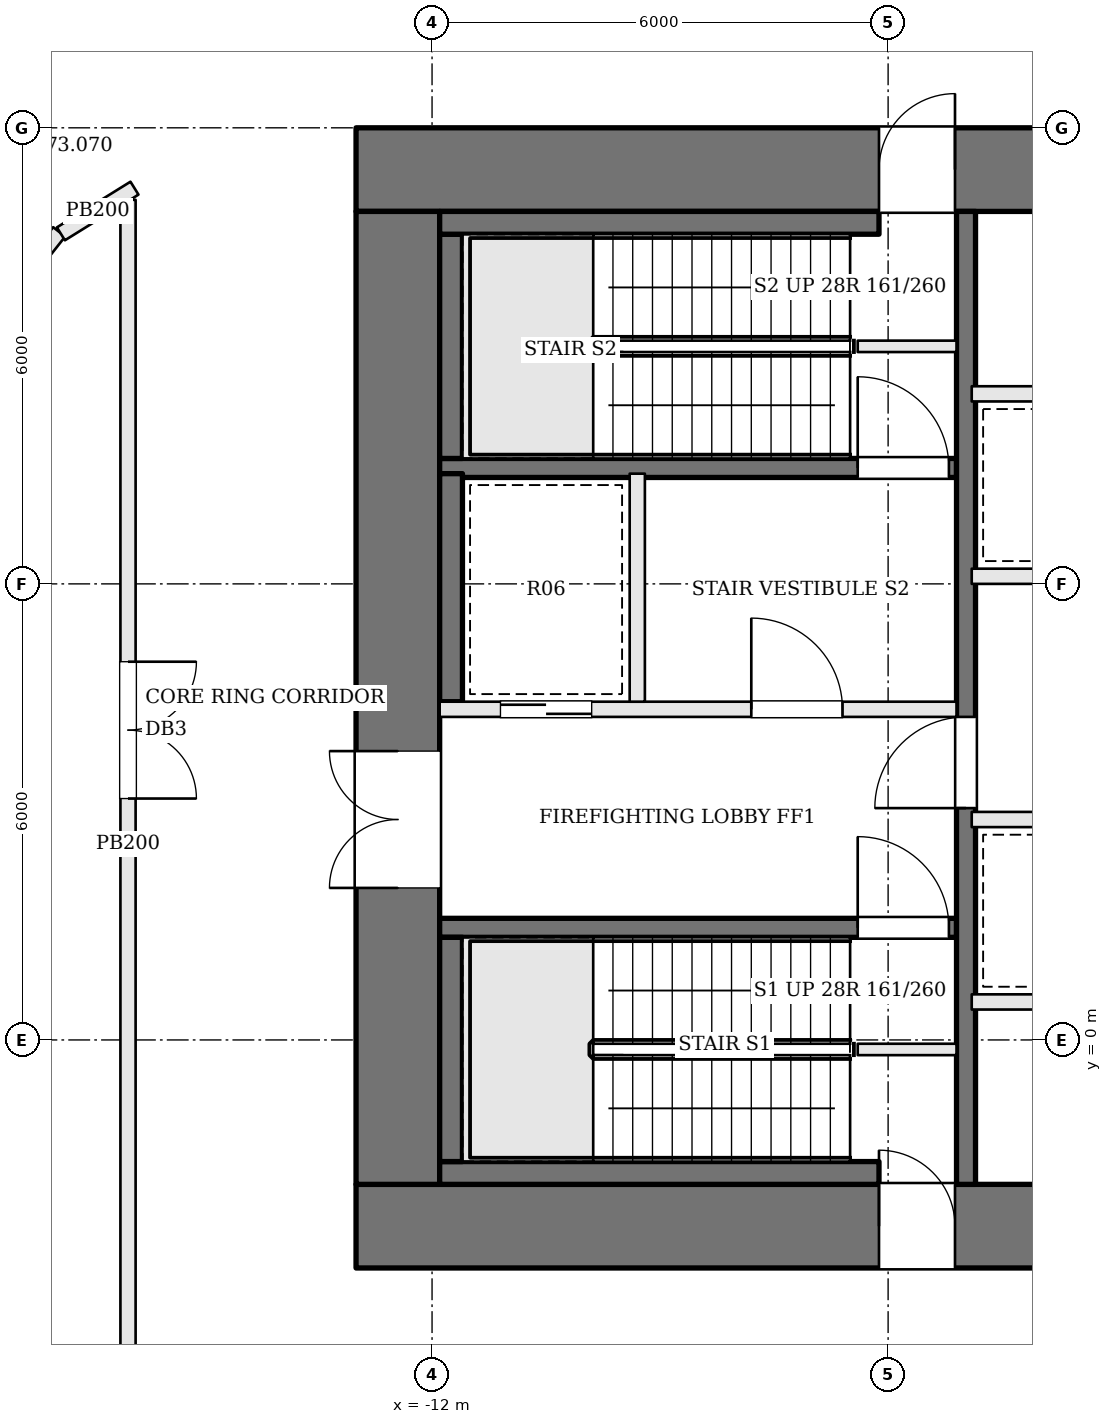
"""IFC4 building model, lengths in metres.
Left out: names, types, materials, properties, quantities, classifications, styles, units other than length and angle.
Written with IfcOpenShell. Run it as: python <this file> out.ifc"""

import sys

from ifc_helpers import new_model, si_unit, direction, frame, frame_2d, origin, place, context, subcontext, project, spatial, rectangle, extrude, element, fill, save


model = new_model("IFC4")
c1 = context("Model", 3, precision=1e-05, world=origin(), true_north=direction((0.0, 1.0)))
c2 = subcontext(c1, "Body", "Model", "MODEL_VIEW")
j1 = project(units=[si_unit("LENGTHUNIT", "METRE"), si_unit("PLANEANGLEUNIT", "RADIAN")], contexts=[c1])
p1 = place(None, origin())
s1 = spatial("IfcSite", under=j1, at=p1, CompositionType="ELEMENT")
p2 = place(p1, origin())
s2 = spatial("IfcBuilding", under=s1, at=p2, CompositionType="ELEMENT")
p3 = place(p2, frame((0.0, 0.0, 169.5)))
s3 = spatial("IfcBuildingStorey", under=s2, at=p3, CompositionType="ELEMENT", Elevation=169.5)
p4 = place(p3, frame((-13.0, 11.45, 0.0), z_axis=(0.0, 0.0, 1.0), x_axis=(1.0, 0.0, 0.0)))
e1 = element("IfcWall", 1, at=p4, inside=s3, PredefinedType="SHEAR", context=c2, shape_type="SweptSolid", body=[
    extrude(rectangle(XDim=26.0, YDim=1.1, at=frame_2d((13.0, 0.0))), origin(), (0.0, 0.0, 1.0), 4.5),
])
p5 = place(p4, frame((9.125, 0.0, 0.0)))
e2 = element("IfcOpeningElement", 2, at=p5, cuts=e1, PredefinedType="OPENING", context=c2, shape_type="SweptSolid", body=[
    extrude(rectangle(XDim=1.2, YDim=2.1, at=frame_2d((0.6, 1.05))), frame((0.0, 0.56, 0.0), z_axis=(0.0, -1.0, 0.0), x_axis=(1.0, 0.0, 0.0)), (0.0, 0.0, 1.0), 1.12),
])
p6 = place(p4, frame((12.375, 0.0, 0.0)))
e3 = element("IfcOpeningElement", 3, at=p6, cuts=e1, PredefinedType="OPENING", context=c2, shape_type="SweptSolid", body=[
    extrude(rectangle(XDim=1.2, YDim=2.1, at=frame_2d((0.6, 1.05))), frame((0.0, 0.56, 0.0), z_axis=(0.0, -1.0, 0.0), x_axis=(1.0, 0.0, 0.0)), (0.0, 0.0, 1.0), 1.12),
])
p7 = place(p4, frame((15.9, 0.0, 0.0)))
e4 = element("IfcOpeningElement", 4, at=p7, cuts=e1, PredefinedType="OPENING", context=c2, shape_type="SweptSolid", body=[
    extrude(rectangle(XDim=0.7, YDim=2.1, at=frame_2d((0.35, 1.05))), frame((0.0, 0.56, 0.0), z_axis=(0.0, -1.0, 0.0), x_axis=(1.0, 0.0, 0.0)), (0.0, 0.0, 1.0), 1.12),
])
p8 = place(p4, frame((6.88, 0.0, 0.0)))
e5 = element("IfcOpeningElement", 5, at=p8, cuts=e1, PredefinedType="OPENING", context=c2, shape_type="SweptSolid", body=[
    extrude(rectangle(XDim=1.0, YDim=2.1, at=frame_2d((0.5, 1.05))), frame((0.0, 0.56, 0.0), z_axis=(0.0, -1.0, 0.0), x_axis=(1.0, 0.0, 0.0)), (0.0, 0.0, 1.0), 1.12),
])
p9 = place(p4, frame((18.12, 0.0, 0.0)))
e6 = element("IfcOpeningElement", 6, at=p9, cuts=e1, PredefinedType="OPENING", context=c2, shape_type="SweptSolid", body=[
    extrude(rectangle(XDim=1.0, YDim=2.1, at=frame_2d((0.5, 1.05))), frame((0.0, 0.56, 0.0), z_axis=(0.0, -1.0, 0.0), x_axis=(1.0, 0.0, 0.0)), (0.0, 0.0, 1.0), 1.12),
])
p10 = place(p3, frame((-13.0, -2.45, 0.0), z_axis=(0.0, 0.0, 1.0), x_axis=(1.0, 0.0, 0.0)))
e7 = element("IfcWall", 7, at=p10, inside=s3, PredefinedType="SHEAR", context=c2, shape_type="SweptSolid", body=[
    extrude(rectangle(XDim=26.0, YDim=1.1, at=frame_2d((13.0, 0.0))), origin(), (0.0, 0.0, 1.0), 4.5),
])
p11 = place(p10, frame((8.975, 0.0, 0.0)))
e8 = element("IfcOpeningElement", 8, at=p11, cuts=e7, PredefinedType="OPENING", context=c2, shape_type="SweptSolid", body=[
    extrude(rectangle(XDim=0.7, YDim=2.1, at=frame_2d((0.35, 1.05))), frame((0.0, 0.56, 0.0), z_axis=(0.0, -1.0, 0.0), x_axis=(1.0, 0.0, 0.0)), (0.0, 0.0, 1.0), 1.12),
])
p12 = place(p10, frame((12.0, 0.0, 0.0)))
e9 = element("IfcOpeningElement", 9, at=p12, cuts=e7, PredefinedType="OPENING", context=c2, shape_type="SweptSolid", body=[
    extrude(rectangle(XDim=1.2, YDim=2.1, at=frame_2d((0.6, 1.05))), frame((0.0, 0.56, 0.0), z_axis=(0.0, -1.0, 0.0), x_axis=(1.0, 0.0, 0.0)), (0.0, 0.0, 1.0), 1.12),
])
p13 = place(p10, frame((15.675, 0.0, 0.0)))
e10 = element("IfcOpeningElement", 10, at=p13, cuts=e7, PredefinedType="OPENING", context=c2, shape_type="SweptSolid", body=[
    extrude(rectangle(XDim=1.2, YDim=2.1, at=frame_2d((0.6, 1.05))), frame((0.0, 0.56, 0.0), z_axis=(0.0, -1.0, 0.0), x_axis=(1.0, 0.0, 0.0)), (0.0, 0.0, 1.0), 1.12),
])
p14 = place(p10, frame((6.88, 0.0, 0.0)))
e11 = element("IfcOpeningElement", 11, at=p14, cuts=e7, PredefinedType="OPENING", context=c2, shape_type="SweptSolid", body=[
    extrude(rectangle(XDim=1.0, YDim=2.1, at=frame_2d((0.5, 1.05))), frame((0.0, 0.56, 0.0), z_axis=(0.0, -1.0, 0.0), x_axis=(1.0, 0.0, 0.0)), (0.0, 0.0, 1.0), 1.12),
])
p15 = place(p10, frame((18.12, 0.0, 0.0)))
e12 = element("IfcOpeningElement", 12, at=p15, cuts=e7, PredefinedType="OPENING", context=c2, shape_type="SweptSolid", body=[
    extrude(rectangle(XDim=1.0, YDim=2.1, at=frame_2d((0.5, 1.05))), frame((0.0, 0.56, 0.0), z_axis=(0.0, -1.0, 0.0), x_axis=(1.0, 0.0, 0.0)), (0.0, 0.0, 1.0), 1.12),
])
p16 = place(p3, frame((-12.45, -1.9, 0.0), z_axis=(0.0, 0.0, 1.0), x_axis=(0.0, 1.0, 0.0)))
e13 = element("IfcWall", 13, at=p16, inside=s3, PredefinedType="SHEAR", context=c2, shape_type="SweptSolid", body=[
    extrude(rectangle(XDim=12.8, YDim=1.1, at=frame_2d((6.4, 0.0))), origin(), (0.0, 0.0, 1.0), 4.5),
])
p17 = place(p16, frame((3.9, 0.0, 0.0)))
e14 = element("IfcOpeningElement", 14, at=p17, cuts=e13, PredefinedType="OPENING", context=c2, shape_type="SweptSolid", body=[
    extrude(rectangle(XDim=1.8, YDim=2.1, at=frame_2d((0.9, 1.05))), frame((0.0, 0.56, 0.0), z_axis=(0.0, -1.0, 0.0), x_axis=(1.0, 0.0, 0.0)), (0.0, 0.0, 1.0), 1.12),
])
for number, where, z_axis, x_axis in (
    (15, (-6.4, -0.125, 0.0), (0.0, 0.0, 1.0), (1.0, 0.0, 0.0)),
    (16, (-6.4, 9.125, 0.0), (0.0, 0.0, 1.0), (1.0, 0.0, 0.0)),
):
    element("IfcWall", number, at=place(p3, frame(where, z_axis=z_axis, x_axis=x_axis)), inside=s3, PredefinedType="SOLIDWALL", context=c2, shape_type="SweptSolid", body=[
        extrude(rectangle(XDim=1.3, YDim=0.15, at=frame_2d((0.65, 0.0))), origin(), (0.0, 0.0, 1.0), 4.3),
    ])
p18 = place(p3, frame((-11.9, 1.475, 0.0), z_axis=(0.0, 0.0, 1.0), x_axis=(1.0, 0.0, 0.0)))
e17 = element("IfcWall", 17, at=p18, inside=s3, PredefinedType="SOLIDWALL", context=c2, shape_type="SweptSolid", body=[
    extrude(rectangle(XDim=6.8, YDim=0.25, at=frame_2d((3.4, 0.0))), origin(), (0.0, 0.0, 1.0), 4.3),
])
p19 = place(p18, frame((5.5, 0.0, 0.0)))
e18 = element("IfcOpeningElement", 18, at=p19, cuts=e17, PredefinedType="OPENING", context=c2, shape_type="SweptSolid", body=[
    extrude(rectangle(XDim=1.2, YDim=2.1, at=frame_2d((0.6, 1.05))), frame((0.0, 0.135, 0.0), z_axis=(0.0, -1.0, 0.0), x_axis=(1.0, 0.0, 0.0)), (0.0, 0.0, 1.0), 0.27),
])
p20 = place(p3, frame((-11.9, 4.35, 0.0), z_axis=(0.0, 0.0, 1.0), x_axis=(1.0, 0.0, 0.0)))
e19 = element("IfcWall", 19, at=p20, inside=s3, PredefinedType="SOLIDWALL", context=c2, shape_type="SweptSolid", body=[
    extrude(rectangle(XDim=6.8, YDim=0.2, at=frame_2d((3.4, 0.0))), origin(), (0.0, 0.0, 1.0), 4.3),
])
p21 = place(p20, frame((4.1, 0.0, 0.0)))
e20 = element("IfcOpeningElement", 20, at=p21, cuts=e19, PredefinedType="OPENING", context=c2, shape_type="SweptSolid", body=[
    extrude(rectangle(XDim=1.2, YDim=2.1, at=frame_2d((0.6, 1.05))), frame((0.0, 0.11, 0.0), z_axis=(0.0, -1.0, 0.0), x_axis=(1.0, 0.0, 0.0)), (0.0, 0.0, 1.0), 0.22),
])
p22 = place(p20, frame((0.8, 0.0, 0.0)))
e21 = element("IfcOpeningElement", 21, at=p22, cuts=e19, PredefinedType="OPENING", context=c2, shape_type="SweptSolid", body=[
    extrude(rectangle(XDim=1.2, YDim=2.1, at=frame_2d((0.6, 1.05))), frame((0.0, 0.11, 0.0), z_axis=(0.0, -1.0, 0.0), x_axis=(1.0, 0.0, 0.0)), (0.0, 0.0, 1.0), 0.22),
])
p23 = place(p3, frame((-11.9, 7.525, 0.0), z_axis=(0.0, 0.0, 1.0), x_axis=(1.0, 0.0, 0.0)))
e22 = element("IfcWall", 22, at=p23, inside=s3, PredefinedType="SOLIDWALL", context=c2, shape_type="SweptSolid", body=[
    extrude(rectangle(XDim=6.8, YDim=0.25, at=frame_2d((3.4, 0.0))), origin(), (0.0, 0.0, 1.0), 4.3),
])
p24 = place(p23, frame((5.5, 0.0, 0.0)))
e23 = element("IfcOpeningElement", 23, at=p24, cuts=e22, PredefinedType="OPENING", context=c2, shape_type="SweptSolid", body=[
    extrude(rectangle(XDim=1.2, YDim=2.1, at=frame_2d((0.6, 1.05))), frame((0.0, 0.135, 0.0), z_axis=(0.0, -1.0, 0.0), x_axis=(1.0, 0.0, 0.0)), (0.0, 0.0, 1.0), 0.27),
])
p25 = place(p3, frame((-9.3, 4.45, 0.0), z_axis=(0.0, 0.0, 1.0), x_axis=(0.0, 1.0, 0.0)))
e24 = element("IfcWall", 24, at=p25, inside=s3, PredefinedType="SOLIDWALL", context=c2, shape_type="SweptSolid", body=[
    extrude(rectangle(XDim=3.0, YDim=0.2, at=frame_2d((1.5, 0.0))), origin(), (0.0, 0.0, 1.0), 4.3),
])
p26 = place(p3, frame((-4.975, -1.9, 0.0), z_axis=(0.0, 0.0, 1.0), x_axis=(0.0, 1.0, 0.0)))
e25 = element("IfcWall", 25, at=p26, inside=s3, PredefinedType="SOLIDWALL", context=c2, shape_type="SweptSolid", body=[
    extrude(rectangle(XDim=12.8, YDim=0.25, at=frame_2d((6.4, 0.0))), origin(), (0.0, 0.0, 1.0), 4.3),
])
p27 = place(p26, frame((4.95, 0.0, 0.0)))
e26 = element("IfcOpeningElement", 26, at=p27, cuts=e25, PredefinedType="OPENING", context=c2, shape_type="SweptSolid", body=[
    extrude(rectangle(XDim=1.2, YDim=2.1, at=frame_2d((0.6, 1.05))), frame((0.0, 0.135, 0.0), z_axis=(0.0, -1.0, 0.0), x_axis=(1.0, 0.0, 0.0)), (0.0, 0.0, 1.0), 0.27),
])
p28 = place(p3, frame((-11.9, -1.75, 0.0), z_axis=(0.0, 0.0, 1.0), x_axis=(1.0, 0.0, 0.0)))
e27 = element("IfcWall", 27, at=p28, inside=s3, PredefinedType="SOLIDWALL", context=c2, shape_type="SweptSolid", body=[
    extrude(rectangle(XDim=5.78, YDim=0.3, at=frame_2d((2.89, 0.0))), origin(), (0.0, 0.0, 1.0), 4.3),
])
p29 = place(p3, frame((-11.75, -1.6, 0.0), z_axis=(0.0, 0.0, 1.0), x_axis=(0.0, 1.0, 0.0)))
e28 = element("IfcWall", 28, at=p29, inside=s3, PredefinedType="SOLIDWALL", context=c2, shape_type="SweptSolid", body=[
    extrude(rectangle(XDim=2.95, YDim=0.3, at=frame_2d((1.475, 0.0))), origin(), (0.0, 0.0, 1.0), 4.3),
])
p30 = place(p3, frame((-11.75, 4.45, 0.0), z_axis=(0.0, 0.0, 1.0), x_axis=(0.0, 1.0, 0.0)))
e29 = element("IfcWall", 29, at=p30, inside=s3, PredefinedType="SOLIDWALL", context=c2, shape_type="SweptSolid", body=[
    extrude(rectangle(XDim=3.0, YDim=0.3, at=frame_2d((1.5, 0.0))), origin(), (0.0, 0.0, 1.0), 4.3),
])
p31 = place(p3, frame((-11.75, 7.65, 0.0), z_axis=(0.0, 0.0, 1.0), x_axis=(0.0, 1.0, 0.0)))
e30 = element("IfcWall", 30, at=p31, inside=s3, PredefinedType="SOLIDWALL", context=c2, shape_type="SweptSolid", body=[
    extrude(rectangle(XDim=2.95, YDim=0.3, at=frame_2d((1.475, 0.0))), origin(), (0.0, 0.0, 1.0), 4.3),
])
p32 = place(p3, frame((-11.9, 10.75, 0.0), z_axis=(0.0, 0.0, 1.0), x_axis=(1.0, 0.0, 0.0)))
e31 = element("IfcWall", 31, at=p32, inside=s3, PredefinedType="SOLIDWALL", context=c2, shape_type="SweptSolid", body=[
    extrude(rectangle(XDim=5.78, YDim=0.3, at=frame_2d((2.89, 0.0))), origin(), (0.0, 0.0, 1.0), 4.3),
])
p33 = place(p3, frame((-4.9, 0.5, 0.0), z_axis=(0.0, 0.0, 1.0), x_axis=(1.0, 0.0, 0.0)))
e32 = element("IfcWall", 32, at=p33, inside=s3, PredefinedType="SOLIDWALL", context=c2, shape_type="SweptSolid", body=[
    extrude(rectangle(XDim=9.8, YDim=0.2, at=frame_2d((4.9, 0.0))), origin(), (0.0, 0.0, 1.0), 4.3),
])
p34 = place(p3, frame((-4.9, 2.9, 0.0), z_axis=(0.0, 0.0, 1.0), x_axis=(1.0, 0.0, 0.0)))
e33 = element("IfcWall", 33, at=p34, inside=s3, PredefinedType="SOLIDWALL", context=c2, shape_type="SweptSolid", body=[
    extrude(rectangle(XDim=9.8, YDim=0.2, at=frame_2d((4.9, 0.0))), origin(), (0.0, 0.0, 1.0), 4.3),
])
p35 = place(p34, frame((2.613, 0.0, 0.0)))
e34 = element("IfcOpeningElement", 34, at=p35, cuts=e33, PredefinedType="OPENING", context=c2, shape_type="SweptSolid", body=[
    extrude(rectangle(XDim=0.9, YDim=2.1, at=frame_2d((0.45, 1.05))), frame((0.0, 0.11, 0.0), z_axis=(0.0, -1.0, 0.0), x_axis=(1.0, 0.0, 0.0)), (0.0, 0.0, 1.0), 0.22),
])
p36 = place(p34, frame((7.463, 0.0, 0.0)))
e35 = element("IfcOpeningElement", 35, at=p36, cuts=e33, PredefinedType="OPENING", context=c2, shape_type="SweptSolid", body=[
    extrude(rectangle(XDim=1.0, YDim=2.1, at=frame_2d((0.5, 1.05))), frame((0.0, 0.11, 0.0), z_axis=(0.0, -1.0, 0.0), x_axis=(1.0, 0.0, 0.0)), (0.0, 0.0, 1.0), 0.22),
])
for number, where, z_axis, x_axis in (
    (36, (-4.9, 6.1, 0.0), (0.0, 0.0, 1.0), (1.0, 0.0, 0.0)),
    (37, (-4.9, 8.5, 0.0), (0.0, 0.0, 1.0), (1.0, 0.0, 0.0)),
):
    element("IfcWall", number, at=place(p3, frame(where, z_axis=z_axis, x_axis=x_axis)), inside=s3, PredefinedType="SOLIDWALL", context=c2, shape_type="SweptSolid", body=[
        extrude(rectangle(XDim=9.8, YDim=0.2, at=frame_2d((4.9, 0.0))), origin(), (0.0, 0.0, 1.0), 4.3),
    ])
p37 = place(p3, frame((-19.849, 6.895, 0.0), z_axis=(0.0, 0.0, 1.0), x_axis=(0.618811760178, 0.785539308669, 0.0)))
e38 = element("IfcWall", 38, at=p37, inside=s3, PredefinedType="PARTITIONING", context=c2, shape_type="SweptSolid", body=[
    extrude(rectangle(XDim=4.756, YDim=0.2, at=frame_2d((2.378, 0.0))), origin(), (0.0, 0.0, 1.0), 4.3),
])
p38 = place(p3, frame((-16.883, 10.605, 0.0), z_axis=(0.0, 0.0, 1.0), x_axis=(0.84954745962, 0.527512193085, 0.0)))
e39 = element("IfcWall", 39, at=p38, inside=s3, PredefinedType="PARTITIONING", context=c2, shape_type="SweptSolid", body=[
    extrude(rectangle(XDim=1.139, YDim=0.2, at=frame_2d((0.57, 0.0))), origin(), (0.0, 0.0, 1.0), 4.3),
])
p39 = place(p3, frame((-16.0, 11.053, 0.0), z_axis=(0.0, 0.0, 1.0), x_axis=(0.0, -1.0, 0.0)))
e40 = element("IfcWall", 40, at=p39, inside=s3, PredefinedType="PARTITIONING", context=c2, shape_type="SweptSolid", body=[
    extrude(rectangle(XDim=16.953, YDim=0.2, at=frame_2d((8.477, 0.0))), origin(), (0.0, 0.0, 1.0), 4.3),
])
p40 = place(p39, frame((6.077, 0.0, 0.0)))
e41 = element("IfcOpeningElement", 41, at=p40, cuts=e40, PredefinedType="OPENING", context=c2, shape_type="SweptSolid", body=[
    extrude(rectangle(XDim=1.8, YDim=2.1, at=frame_2d((0.9, 1.05))), frame((0.0, 0.11, 0.0), z_axis=(0.0, -1.0, 0.0), x_axis=(1.0, 0.0, 0.0)), (0.0, 0.0, 1.0), 0.22),
])
p41 = place(p17, origin())
e42 = element("IfcDoor", 42, at=p41, inside=s3, OperationType="DOUBLE_DOOR_SINGLE_SWING", PredefinedType="DOOR", context=c2, shape_type="SweptSolid", body=[
    extrude(rectangle(XDim=1.8, YDim=2.1, at=frame_2d((0.9, 1.05))), frame((0.0, 0.025, 0.0), z_axis=(0.0, -1.0, 0.0), x_axis=(1.0, 0.0, 0.0)), (0.0, 0.0, 1.0), 0.05),
])
fill(e14, e42)
p42 = place(p27, origin())
e43 = element("IfcDoor", 43, at=p42, inside=s3, OperationType="SINGLE_SWING_LEFT", PredefinedType="DOOR", context=c2, shape_type="SweptSolid", body=[
    extrude(rectangle(XDim=1.2, YDim=2.1, at=frame_2d((0.6, 1.05))), frame((0.0, 0.025, 0.0), z_axis=(0.0, -1.0, 0.0), x_axis=(1.0, 0.0, 0.0)), (0.0, 0.0, 1.0), 0.05),
])
fill(e26, e43)
p43 = place(p21, origin())
e44 = element("IfcDoor", 44, at=p43, inside=s3, OperationType="SINGLE_SWING_LEFT", PredefinedType="DOOR", context=c2, shape_type="SweptSolid", body=[
    extrude(rectangle(XDim=1.2, YDim=2.1, at=frame_2d((0.6, 1.05))), frame((0.0, 0.025, 0.0), z_axis=(0.0, -1.0, 0.0), x_axis=(1.0, 0.0, 0.0)), (0.0, 0.0, 1.0), 0.05),
])
fill(e20, e44)
p44 = place(p19, origin())
e45 = element("IfcDoor", 45, at=p44, inside=s3, OperationType="SINGLE_SWING_LEFT", PredefinedType="DOOR", context=c2, shape_type="SweptSolid", body=[
    extrude(rectangle(XDim=1.2, YDim=2.1, at=frame_2d((0.6, 1.05))), frame((0.0, 0.025, 0.0), z_axis=(0.0, -1.0, 0.0), x_axis=(1.0, 0.0, 0.0)), (0.0, 0.0, 1.0), 0.05),
])
fill(e18, e45)
p45 = place(p24, origin())
e46 = element("IfcDoor", 46, at=p45, inside=s3, OperationType="SINGLE_SWING_LEFT", PredefinedType="DOOR", context=c2, shape_type="SweptSolid", body=[
    extrude(rectangle(XDim=1.2, YDim=2.1, at=frame_2d((0.6, 1.05))), frame((0.0, 0.025, 0.0), z_axis=(0.0, -1.0, 0.0), x_axis=(1.0, 0.0, 0.0)), (0.0, 0.0, 1.0), 0.05),
])
fill(e23, e46)
p46 = place(p22, origin())
e47 = element("IfcDoor", 47, at=p46, inside=s3, OperationType="SLIDING_TO_RIGHT", PredefinedType="DOOR", context=c2, shape_type="SweptSolid", body=[
    extrude(rectangle(XDim=1.2, YDim=2.1, at=frame_2d((0.6, 1.05))), frame((0.0, 0.025, 0.0), z_axis=(0.0, -1.0, 0.0), x_axis=(1.0, 0.0, 0.0)), (0.0, 0.0, 1.0), 0.05),
])
fill(e21, e47)
p47 = place(p14, origin())
e48 = element("IfcDoor", 48, at=p47, inside=s3, OperationType="SINGLE_SWING_LEFT", PredefinedType="DOOR", context=c2, shape_type="SweptSolid", body=[
    extrude(rectangle(XDim=1.0, YDim=2.1, at=frame_2d((0.5, 1.05))), frame((0.0, 0.025, 0.0), z_axis=(0.0, -1.0, 0.0), x_axis=(1.0, 0.0, 0.0)), (0.0, 0.0, 1.0), 0.05),
])
fill(e11, e48)
p48 = place(p8, origin())
e49 = element("IfcDoor", 49, at=p48, inside=s3, OperationType="SINGLE_SWING_RIGHT", PredefinedType="DOOR", context=c2, shape_type="SweptSolid", body=[
    extrude(rectangle(XDim=1.0, YDim=2.1, at=frame_2d((0.5, 1.05))), frame((0.0, 0.025, 0.0), z_axis=(0.0, -1.0, 0.0), x_axis=(1.0, 0.0, 0.0)), (0.0, 0.0, 1.0), 0.05),
])
fill(e5, e49)
p49 = place(p40, origin())
e50 = element("IfcDoor", 50, at=p49, inside=s3, OperationType="DOUBLE_DOOR_SINGLE_SWING", PredefinedType="DOOR", context=c2, shape_type="SweptSolid", body=[
    extrude(rectangle(XDim=1.8, YDim=2.1, at=frame_2d((0.9, 1.05))), frame((0.0, 0.025, 0.0), z_axis=(0.0, -1.0, 0.0), x_axis=(1.0, 0.0, 0.0)), (0.0, 0.0, 1.0), 0.05),
])
fill(e41, e50)
save(model, sys.argv[1])
